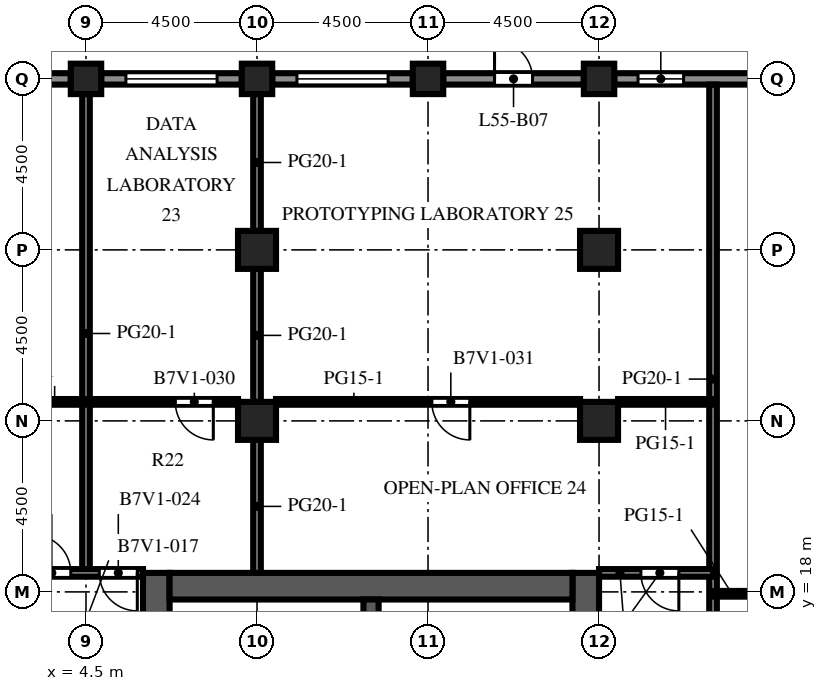
"""IFC4 building model, lengths in metres.
Left out: names, types, materials, properties, quantities, classifications, styles, units other than length and angle.
Written with IfcOpenShell. Run it as: python <this file> out.ifc"""

import sys

from ifc_helpers import new_model, si_unit, direction, frame, frame_2d, origin, origin_2d, place, context, subcontext, project, spatial, rectangle, extrude, element, fill, save


model = new_model("IFC4")
c1 = context("Model", 3, precision=1e-05, world=origin(), true_north=direction((0.0, 1.0)))
c2 = subcontext(c1, "Body", "Model", "MODEL_VIEW")
j1 = project(units=[si_unit("LENGTHUNIT", "METRE"), si_unit("PLANEANGLEUNIT", "RADIAN")], contexts=[c1])
p1 = place(None, origin())
s1 = spatial("IfcSite", under=j1, at=p1, CompositionType="ELEMENT")
p2 = place(p1, origin())
s2 = spatial("IfcBuilding", under=s1, at=p2, CompositionType="ELEMENT")
p3 = place(p2, frame((0.0, 0.0, 243.9)))
s3 = spatial("IfcBuildingStorey", under=s2, at=p3, CompositionType="ELEMENT", Elevation=243.9)
for number, where, z_axis, x_axis in (
    (1, (4.5, 31.5, 0.0), (0.0, 0.0, 1.0), (1.0, 0.0, 0.0)),
    (2, (9.0, 31.5, 0.0), (0.0, 0.0, 1.0), (1.0, 0.0, 0.0)),
    (3, (13.5, 31.5, 0.0), (0.0, 0.0, 1.0), (1.0, 0.0, 0.0)),
    (4, (18.0, 31.5, 0.0), (0.0, 0.0, 1.0), (1.0, 0.0, 0.0)),
):
    element("IfcColumn", number, at=place(p3, frame(where, z_axis=z_axis, x_axis=x_axis)), inside=s3, PredefinedType="COLUMN", context=c2, shape_type="SweptSolid", body=[
        extrude(rectangle(XDim=0.8, YDim=0.8, at=origin_2d()), origin(), (0.0, 0.0, 1.0), 4.1),
    ])
for number, where, z_axis, x_axis in (
    (5, (9.0, 22.5, 0.0), (0.0, 0.0, 1.0), (1.0, 0.0, 0.0)),
    (6, (9.0, 27.0, 0.0), (0.0, 0.0, 1.0), (1.0, 0.0, 0.0)),
    (7, (18.0, 22.5, 0.0), (0.0, 0.0, 1.0), (1.0, 0.0, 0.0)),
    (8, (18.0, 27.0, 0.0), (0.0, 0.0, 1.0), (1.0, 0.0, 0.0)),
):
    element("IfcColumn", number, at=place(p3, frame(where, z_axis=z_axis, x_axis=x_axis)), inside=s3, PredefinedType="COLUMN", context=c2, shape_type="SweptSolid", body=[
        extrude(rectangle(XDim=1.0, YDim=1.0, at=origin_2d()), origin(), (0.0, 0.0, 1.0), 4.1),
    ])
p4 = place(p3, frame((6.35, -9.0, 0.0), z_axis=(0.0, 0.0, 1.0), x_axis=(0.0, 1.0, 0.0)))
e9 = element("IfcWall", 9, at=p4, inside=s3, PredefinedType="SHEAR", context=c2, shape_type="SweptSolid", body=[
    extrude(rectangle(XDim=27.5, YDim=0.7, at=frame_2d((13.75, 0.0))), origin(), (0.0, 0.0, 1.0), 4.1),
])
p5 = place(p4, frame((12.55, 0.0, 0.0)))
e10 = element("IfcOpeningElement", 10, at=p5, cuts=e9, PredefinedType="OPENING", context=c2, shape_type="SweptSolid", body=[
    extrude(rectangle(XDim=2.4, YDim=2.4, at=frame_2d((1.2, 1.2))), frame((0.0, 0.36, 0.0), z_axis=(0.0, -1.0, 0.0), x_axis=(1.0, 0.0, 0.0)), (0.0, 0.0, 1.0), 0.72),
])
p6 = place(p4, frame((3.9, 0.0, 0.0)))
e11 = element("IfcOpeningElement", 11, at=p6, cuts=e9, PredefinedType="OPENING", context=c2, shape_type="SweptSolid", body=[
    extrude(rectangle(XDim=1.2, YDim=2.1, at=frame_2d((0.6, 1.05))), frame((0.0, 0.36, 0.0), z_axis=(0.0, -1.0, 0.0), x_axis=(1.0, 0.0, 0.0)), (0.0, 0.0, 1.0), 0.72),
])
p7 = place(p4, frame((22.4, 0.0, 0.0)))
e12 = element("IfcOpeningElement", 12, at=p7, cuts=e9, PredefinedType="OPENING", context=c2, shape_type="SweptSolid", body=[
    extrude(rectangle(XDim=1.2, YDim=2.1, at=frame_2d((0.6, 1.05))), frame((0.0, 0.36, 0.0), z_axis=(0.0, -1.0, 0.0), x_axis=(1.0, 0.0, 0.0)), (0.0, 0.0, 1.0), 0.72),
])
p8 = place(p3, frame((17.65, -9.0, 0.0), z_axis=(0.0, 0.0, 1.0), x_axis=(0.0, 1.0, 0.0)))
e13 = element("IfcWall", 13, at=p8, inside=s3, PredefinedType="SHEAR", context=c2, shape_type="SweptSolid", body=[
    extrude(rectangle(XDim=27.5, YDim=0.7, at=frame_2d((13.75, 0.0))), origin(), (0.0, 0.0, 1.0), 4.1),
])
p9 = place(p8, frame((12.55, 0.0, 0.0)))
e14 = element("IfcOpeningElement", 14, at=p9, cuts=e13, PredefinedType="OPENING", context=c2, shape_type="SweptSolid", body=[
    extrude(rectangle(XDim=2.4, YDim=2.4, at=frame_2d((1.2, 1.2))), frame((0.0, 0.36, 0.0), z_axis=(0.0, -1.0, 0.0), x_axis=(1.0, 0.0, 0.0)), (0.0, 0.0, 1.0), 0.72),
])
p10 = place(p8, frame((6.825, 0.0, 0.0)))
e15 = element("IfcOpeningElement", 15, at=p10, cuts=e13, PredefinedType="OPENING", context=c2, shape_type="SweptSolid", body=[
    extrude(rectangle(XDim=1.2, YDim=2.1, at=frame_2d((0.6, 1.05))), frame((0.0, 0.36, 0.0), z_axis=(0.0, -1.0, 0.0), x_axis=(1.0, 0.0, 0.0)), (0.0, 0.0, 1.0), 0.72),
])
p11 = place(p8, frame((19.475, 0.0, 0.0)))
e16 = element("IfcOpeningElement", 16, at=p11, cuts=e13, PredefinedType="OPENING", context=c2, shape_type="SweptSolid", body=[
    extrude(rectangle(XDim=1.2, YDim=2.1, at=frame_2d((0.6, 1.05))), frame((0.0, 0.36, 0.0), z_axis=(0.0, -1.0, 0.0), x_axis=(1.0, 0.0, 0.0)), (0.0, 0.0, 1.0), 0.72),
])
p12 = place(p3, frame((6.7, 18.15, 0.0), z_axis=(0.0, 0.0, 1.0), x_axis=(1.0, 0.0, 0.0)))
e17 = element("IfcWall", 17, at=p12, inside=s3, PredefinedType="SHEAR", context=c2, shape_type="SweptSolid", body=[
    extrude(rectangle(XDim=10.6, YDim=0.7, at=frame_2d((5.3, 0.0))), origin(), (0.0, 0.0, 1.0), 4.1),
])
p13 = place(p3, frame((12.0, 10.2, 0.0), z_axis=(0.0, 0.0, 1.0), x_axis=(0.0, 1.0, 0.0)))
e18 = element("IfcWall", 18, at=p13, inside=s3, PredefinedType="SHEAR", context=c2, shape_type="SweptSolid", body=[
    extrude(rectangle(XDim=7.6, YDim=0.4, at=frame_2d((3.8, 0.0))), origin(), (0.0, 0.0, 1.0), 4.1),
])
p14 = place(p3, frame((18.4, 31.5, 0.0), z_axis=(0.0, 0.0, 1.0), x_axis=(1.0, 0.0, 0.0)))
e19 = element("IfcWall", 19, at=p14, inside=s3, PredefinedType="SOLIDWALL", context=c2, shape_type="SweptSolid", body=[
    extrude(rectangle(XDim=3.7, YDim=0.3, at=frame_2d((1.85, 0.0))), origin(), (0.0, 0.0, 1.0), 2.85),
])
p15 = place(p14, frame((0.625, 0.0, 0.8)))
e20 = element("IfcOpeningElement", 20, at=p15, cuts=e19, PredefinedType="OPENING", context=c2, shape_type="SweptSolid", body=[
    extrude(rectangle(XDim=1.2, YDim=1.7, at=frame_2d((0.6, 0.85))), frame((0.0, 0.16, 0.0), z_axis=(0.0, -1.0, 0.0), x_axis=(1.0, 0.0, 0.0)), (0.0, 0.0, 1.0), 0.32),
])
p16 = place(p3, frame((13.9, 31.5, 0.0), z_axis=(0.0, 0.0, 1.0), x_axis=(1.0, 0.0, 0.0)))
e21 = element("IfcWall", 21, at=p16, inside=s3, PredefinedType="SOLIDWALL", context=c2, shape_type="SweptSolid", body=[
    extrude(rectangle(XDim=3.7, YDim=0.3, at=frame_2d((1.85, 0.0))), origin(), (0.0, 0.0, 1.0), 2.85),
])
p17 = place(p16, frame((1.35, 0.0, 0.0)))
e22 = element("IfcOpeningElement", 22, at=p17, cuts=e21, PredefinedType="OPENING", context=c2, shape_type="SweptSolid", body=[
    extrude(rectangle(XDim=1.0, YDim=2.2, at=frame_2d((0.5, 1.1))), frame((0.0, 0.16, 0.0), z_axis=(0.0, -1.0, 0.0), x_axis=(1.0, 0.0, 0.0)), (0.0, 0.0, 1.0), 0.32),
])
p18 = place(p3, frame((9.4, 31.5, 0.0), z_axis=(0.0, 0.0, 1.0), x_axis=(1.0, 0.0, 0.0)))
e23 = element("IfcWall", 23, at=p18, inside=s3, PredefinedType="SOLIDWALL", context=c2, shape_type="SweptSolid", body=[
    extrude(rectangle(XDim=3.7, YDim=0.3, at=frame_2d((1.85, 0.0))), origin(), (0.0, 0.0, 1.0), 2.85),
])
p19 = place(p18, frame((0.65, 0.0, 0.8)))
e24 = element("IfcOpeningElement", 24, at=p19, cuts=e23, PredefinedType="OPENING", context=c2, shape_type="SweptSolid", body=[
    extrude(rectangle(XDim=2.4, YDim=1.7, at=frame_2d((1.2, 0.85))), frame((0.0, 0.16, 0.0), z_axis=(0.0, -1.0, 0.0), x_axis=(1.0, 0.0, 0.0)), (0.0, 0.0, 1.0), 0.32),
])
p20 = place(p3, frame((4.9, 31.5, 0.0), z_axis=(0.0, 0.0, 1.0), x_axis=(1.0, 0.0, 0.0)))
e25 = element("IfcWall", 25, at=p20, inside=s3, PredefinedType="SOLIDWALL", context=c2, shape_type="SweptSolid", body=[
    extrude(rectangle(XDim=3.7, YDim=0.3, at=frame_2d((1.85, 0.0))), origin(), (0.0, 0.0, 1.0), 2.85),
])
p21 = place(p20, frame((0.65, 0.0, 0.8)))
e26 = element("IfcOpeningElement", 26, at=p21, cuts=e25, PredefinedType="OPENING", context=c2, shape_type="SweptSolid", body=[
    extrude(rectangle(XDim=2.4, YDim=1.7, at=frame_2d((1.2, 0.85))), frame((0.0, 0.16, 0.0), z_axis=(0.0, -1.0, 0.0), x_axis=(1.0, 0.0, 0.0)), (0.0, 0.0, 1.0), 0.32),
])
p22 = place(p3, frame((0.4, 31.5, 0.0), z_axis=(0.0, 0.0, 1.0), x_axis=(1.0, 0.0, 0.0)))
e27 = element("IfcWall", 27, at=p22, inside=s3, PredefinedType="SOLIDWALL", context=c2, shape_type="SweptSolid", body=[
    extrude(rectangle(XDim=3.7, YDim=0.3, at=frame_2d((1.85, 0.0))), origin(), (0.0, 0.0, 1.0), 2.85),
])
p23 = place(p22, frame((0.65, 0.0, 0.8)))
e28 = element("IfcOpeningElement", 28, at=p23, cuts=e27, PredefinedType="OPENING", context=c2, shape_type="SweptSolid", body=[
    extrude(rectangle(XDim=2.4, YDim=1.7, at=frame_2d((1.2, 0.85))), frame((0.0, 0.16, 0.0), z_axis=(0.0, -1.0, 0.0), x_axis=(1.0, 0.0, 0.0)), (0.0, 0.0, 1.0), 0.32),
])
p24 = place(p3, frame((8.1, 14.912, 0.0), z_axis=(0.0, 0.0, 1.0), x_axis=(0.0, 1.0, 0.0)))
e29 = element("IfcWall", 29, at=p24, inside=s3, PredefinedType="PARTITIONING", context=c2, shape_type="SweptSolid", body=[
    extrude(rectangle(XDim=2.888, YDim=0.1, at=frame_2d((1.444, 0.0))), origin(), (0.0, 0.0, 1.0), 3.65),
])
p25 = place(p24, frame((0.944, 0.0, 0.0)))
e30 = element("IfcOpeningElement", 30, at=p25, cuts=e29, PredefinedType="OPENING", context=c2, shape_type="SweptSolid", body=[
    extrude(rectangle(XDim=1.0, YDim=2.1, at=frame_2d((0.5, 1.05))), frame((0.0, 0.06, 0.0), z_axis=(0.0, -1.0, 0.0), x_axis=(1.0, 0.0, 0.0)), (0.0, 0.0, 1.0), 0.12),
])
p26 = place(p3, frame((4.5, 18.5, 0.0), z_axis=(0.0, 0.0, 1.0), x_axis=(0.0, 1.0, 0.0)))
e31 = element("IfcWall", 31, at=p26, inside=s3, PredefinedType="PARTITIONING", context=c2, shape_type="SweptSolid", body=[
    extrude(rectangle(XDim=12.6, YDim=0.2, at=frame_2d((6.3, 0.0))), origin(), (0.0, 0.0, 1.0), 3.65),
])
for number, where, z_axis, x_axis in (
    (32, (9.0, 18.5, 0.0), (0.0, 0.0, 1.0), (0.0, 1.0, 0.0)),
    (33, (9.0, 23.0, 0.0), (0.0, 0.0, 1.0), (0.0, 1.0, 0.0)),
):
    element("IfcWall", number, at=place(p3, frame(where, z_axis=z_axis, x_axis=x_axis)), inside=s3, PredefinedType="PARTITIONING", context=c2, shape_type="SweptSolid", body=[
        extrude(rectangle(XDim=3.5, YDim=0.2, at=frame_2d((1.75, 0.0))), origin(), (0.0, 0.0, 1.0), 3.65),
    ])
p27 = place(p3, frame((9.0, 27.5, 0.0), z_axis=(0.0, 0.0, 1.0), x_axis=(0.0, 1.0, 0.0)))
e34 = element("IfcWall", 34, at=p27, inside=s3, PredefinedType="PARTITIONING", context=c2, shape_type="SweptSolid", body=[
    extrude(rectangle(XDim=3.6, YDim=0.2, at=frame_2d((1.8, 0.0))), origin(), (0.0, 0.0, 1.0), 3.65),
])
p28 = place(p3, frame((21.0, 31.35, 0.0), z_axis=(0.0, 0.0, 1.0), x_axis=(0.0, -1.0, 0.0)))
e35 = element("IfcWall", 35, at=p28, inside=s3, PredefinedType="PARTITIONING", context=c2, shape_type="SweptSolid", body=[
    extrude(rectangle(XDim=25.1, YDim=0.2, at=frame_2d((12.55, 0.0))), origin(), (0.0, 0.0, 1.0), 3.65),
])
p29 = place(p28, frame((15.5, 0.0, 0.0)))
e36 = element("IfcOpeningElement", 36, at=p29, cuts=e35, PredefinedType="OPENING", context=c2, shape_type="SweptSolid", body=[
    extrude(rectangle(XDim=1.0, YDim=2.1, at=frame_2d((0.5, 1.05))), frame((0.0, 0.11, 0.0), z_axis=(0.0, -1.0, 0.0), x_axis=(1.0, 0.0, 0.0)), (0.0, 0.0, 1.0), 0.22),
])
p30 = place(p3, frame((21.0, 17.95, 0.0), z_axis=(0.0, 0.0, 1.0), x_axis=(1.0, 0.0, 0.0)))
e37 = element("IfcWall", 37, at=p30, inside=s3, PredefinedType="PARTITIONING", context=c2, shape_type="SweptSolid", body=[
    extrude(rectangle(XDim=1.0, YDim=0.15, at=frame_2d((0.5, 0.0))), origin(), (0.0, 0.0, 1.0), 3.65),
])
p31 = place(p3, frame((1.5, 18.5, 0.0), z_axis=(0.0, 0.0, 1.0), x_axis=(1.0, 0.0, 0.0)))
e38 = element("IfcWall", 38, at=p31, inside=s3, PredefinedType="PARTITIONING", context=c2, shape_type="SweptSolid", body=[
    extrude(rectangle(XDim=4.5, YDim=0.2, at=frame_2d((2.25, 0.0))), origin(), (0.0, 0.0, 1.0), 3.65),
])
p32 = place(p31, frame((1.6, 0.0, 0.0)))
e39 = element("IfcOpeningElement", 39, at=p32, cuts=e38, PredefinedType="OPENING", context=c2, shape_type="SweptSolid", body=[
    extrude(rectangle(XDim=1.0, YDim=2.1, at=frame_2d((0.5, 1.05))), frame((0.0, 0.11, 0.0), z_axis=(0.0, -1.0, 0.0), x_axis=(1.0, 0.0, 0.0)), (0.0, 0.0, 1.0), 0.22),
])
p33 = place(p31, frame((3.35, 0.0, 0.0)))
e40 = element("IfcOpeningElement", 40, at=p33, cuts=e38, PredefinedType="OPENING", context=c2, shape_type="SweptSolid", body=[
    extrude(rectangle(XDim=1.0, YDim=2.1, at=frame_2d((0.5, 1.05))), frame((0.0, 0.11, 0.0), z_axis=(0.0, -1.0, 0.0), x_axis=(1.0, 0.0, 0.0)), (0.0, 0.0, 1.0), 0.22),
])
p34 = place(p3, frame((18.0, 18.5, 0.0), z_axis=(0.0, 0.0, 1.0), x_axis=(1.0, 0.0, 0.0)))
e41 = element("IfcWall", 41, at=p34, inside=s3, PredefinedType="PARTITIONING", context=c2, shape_type="SweptSolid", body=[
    extrude(rectangle(XDim=3.0, YDim=0.2, at=frame_2d((1.5, 0.0))), origin(), (0.0, 0.0, 1.0), 3.65),
])
p35 = place(p34, frame((1.1, 0.0, 0.0)))
e42 = element("IfcOpeningElement", 42, at=p35, cuts=e41, PredefinedType="OPENING", context=c2, shape_type="SweptSolid", body=[
    extrude(rectangle(XDim=1.0, YDim=2.1, at=frame_2d((0.5, 1.05))), frame((0.0, 0.11, 0.0), z_axis=(0.0, -1.0, 0.0), x_axis=(1.0, 0.0, 0.0)), (0.0, 0.0, 1.0), 0.22),
])
p36 = place(p3, frame((0.5, 23.0, 0.0), z_axis=(0.0, 0.0, 1.0), x_axis=(1.0, 0.0, 0.0)))
e43 = element("IfcWall", 43, at=p36, inside=s3, PredefinedType="PARTITIONING", context=c2, shape_type="SweptSolid", body=[
    extrude(rectangle(XDim=8.0, YDim=0.15, at=frame_2d((4.0, 0.0))), origin(), (0.0, 0.0, 1.0), 3.65),
])
p37 = place(p36, frame((6.35, 0.0, 0.0)))
e44 = element("IfcOpeningElement", 44, at=p37, cuts=e43, PredefinedType="OPENING", context=c2, shape_type="SweptSolid", body=[
    extrude(rectangle(XDim=1.0, YDim=2.1, at=frame_2d((0.5, 1.05))), frame((0.0, 0.085, 0.0), z_axis=(0.0, -1.0, 0.0), x_axis=(1.0, 0.0, 0.0)), (0.0, 0.0, 1.0), 0.17),
])
p38 = place(p3, frame((9.5, 23.0, 0.0), z_axis=(0.0, 0.0, 1.0), x_axis=(1.0, 0.0, 0.0)))
e45 = element("IfcWall", 45, at=p38, inside=s3, PredefinedType="PARTITIONING", context=c2, shape_type="SweptSolid", body=[
    extrude(rectangle(XDim=8.0, YDim=0.15, at=frame_2d((4.0, 0.0))), origin(), (0.0, 0.0, 1.0), 3.65),
])
p39 = place(p38, frame((4.1, 0.0, 0.0)))
e46 = element("IfcOpeningElement", 46, at=p39, cuts=e45, PredefinedType="OPENING", context=c2, shape_type="SweptSolid", body=[
    extrude(rectangle(XDim=1.0, YDim=2.1, at=frame_2d((0.5, 1.05))), frame((0.0, 0.085, 0.0), z_axis=(0.0, -1.0, 0.0), x_axis=(1.0, 0.0, 0.0)), (0.0, 0.0, 1.0), 0.17),
])
p40 = place(p3, frame((18.5, 23.0, 0.0), z_axis=(0.0, 0.0, 1.0), x_axis=(1.0, 0.0, 0.0)))
e47 = element("IfcWall", 47, at=p40, inside=s3, PredefinedType="PARTITIONING", context=c2, shape_type="SweptSolid", body=[
    extrude(rectangle(XDim=2.5, YDim=0.15, at=frame_2d((1.25, 0.0))), origin(), (0.0, 0.0, 1.0), 3.65),
])
p41 = place(p15, origin())
e48 = element("IfcWindow", 48, at=p41, inside=s3, PartitioningType="SINGLE_PANEL", PredefinedType="WINDOW", context=c2, shape_type="SweptSolid", body=[
    extrude(rectangle(XDim=1.2, YDim=1.7, at=frame_2d((0.6, 0.85))), frame((0.0, 0.03, 0.0), z_axis=(0.0, -1.0, 0.0), x_axis=(1.0, 0.0, 0.0)), (0.0, 0.0, 1.0), 0.06),
])
fill(e20, e48)
p42 = place(p17, origin())
e49 = element("IfcDoor", 49, at=p42, inside=s3, OperationType="SINGLE_SWING_LEFT", PredefinedType="DOOR", context=c2, shape_type="SweptSolid", body=[
    extrude(rectangle(XDim=1.0, YDim=2.2, at=frame_2d((0.5, 1.1))), frame((0.0, 0.025, 0.0), z_axis=(0.0, -1.0, 0.0), x_axis=(1.0, 0.0, 0.0)), (0.0, 0.0, 1.0), 0.05),
])
fill(e22, e49)
p43 = place(p19, origin())
e50 = element("IfcWindow", 50, at=p43, inside=s3, PartitioningType="SINGLE_PANEL", PredefinedType="WINDOW", context=c2, shape_type="SweptSolid", body=[
    extrude(rectangle(XDim=2.4, YDim=1.7, at=frame_2d((1.2, 0.85))), frame((0.0, 0.03, 0.0), z_axis=(0.0, -1.0, 0.0), x_axis=(1.0, 0.0, 0.0)), (0.0, 0.0, 1.0), 0.06),
])
fill(e24, e50)
p44 = place(p21, origin())
e51 = element("IfcWindow", 51, at=p44, inside=s3, PartitioningType="SINGLE_PANEL", PredefinedType="WINDOW", context=c2, shape_type="SweptSolid", body=[
    extrude(rectangle(XDim=2.4, YDim=1.7, at=frame_2d((1.2, 0.85))), frame((0.0, 0.03, 0.0), z_axis=(0.0, -1.0, 0.0), x_axis=(1.0, 0.0, 0.0)), (0.0, 0.0, 1.0), 0.06),
])
fill(e26, e51)
p45 = place(p32, origin())
e52 = element("IfcDoor", 52, at=p45, inside=s3, OperationType="SINGLE_SWING_LEFT", PredefinedType="DOOR", context=c2, shape_type="SweptSolid", body=[
    extrude(rectangle(XDim=1.0, YDim=2.1, at=frame_2d((0.5, 1.05))), frame((0.0, 0.025, 0.0), z_axis=(0.0, -1.0, 0.0), x_axis=(1.0, 0.0, 0.0)), (0.0, 0.0, 1.0), 0.05),
])
fill(e39, e52)
p46 = place(p33, origin())
e53 = element("IfcDoor", 53, at=p46, inside=s3, OperationType="SINGLE_SWING_RIGHT", PredefinedType="DOOR", context=c2, shape_type="SweptSolid", body=[
    extrude(rectangle(XDim=1.0, YDim=2.1, at=frame_2d((0.5, 1.05))), frame((0.0, 0.025, 0.0), z_axis=(0.0, -1.0, 0.0), x_axis=(1.0, 0.0, 0.0)), (0.0, 0.0, 1.0), 0.05),
])
fill(e40, e53)
p47 = place(p35, origin())
e54 = element("IfcDoor", 54, at=p47, inside=s3, OperationType="SINGLE_SWING_RIGHT", PredefinedType="DOOR", context=c2, shape_type="SweptSolid", body=[
    extrude(rectangle(XDim=1.0, YDim=2.1, at=frame_2d((0.5, 1.05))), frame((0.0, 0.025, 0.0), z_axis=(0.0, -1.0, 0.0), x_axis=(1.0, 0.0, 0.0)), (0.0, 0.0, 1.0), 0.05),
])
fill(e42, e54)
p48 = place(p37, origin())
e55 = element("IfcDoor", 55, at=p48, inside=s3, OperationType="SINGLE_SWING_RIGHT", PredefinedType="DOOR", context=c2, shape_type="SweptSolid", body=[
    extrude(rectangle(XDim=1.0, YDim=2.1, at=frame_2d((0.5, 1.05))), frame((0.0, 0.025, 0.0), z_axis=(0.0, -1.0, 0.0), x_axis=(1.0, 0.0, 0.0)), (0.0, 0.0, 1.0), 0.05),
])
fill(e44, e55)
p49 = place(p39, origin())
e56 = element("IfcDoor", 56, at=p49, inside=s3, OperationType="SINGLE_SWING_RIGHT", PredefinedType="DOOR", context=c2, shape_type="SweptSolid", body=[
    extrude(rectangle(XDim=1.0, YDim=2.1, at=frame_2d((0.5, 1.05))), frame((0.0, 0.025, 0.0), z_axis=(0.0, -1.0, 0.0), x_axis=(1.0, 0.0, 0.0)), (0.0, 0.0, 1.0), 0.05),
])
fill(e46, e56)
save(model, sys.argv[1])
